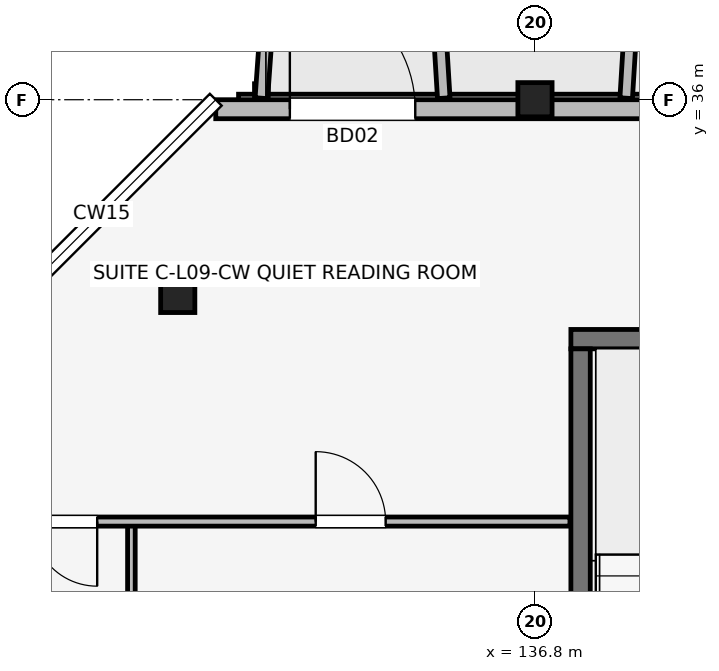
"""IFC4 building model, lengths in metres.
Left out: names, types, materials, properties, quantities, classifications, styles, units other than length and angle.
Written with IfcOpenShell. Run it as: python <this file> out.ifc"""

import sys

from ifc_helpers import new_model, si_unit, direction, frame, frame_2d, origin, origin_2d, place, context, subcontext, project, spatial, rectangle, extrude, element, fill, save


model = new_model("IFC4")
c1 = context("Model", 3, precision=1e-05, world=origin(), true_north=direction((0.0, 1.0)))
c2 = subcontext(c1, "Body", "Model", "MODEL_VIEW")
j1 = project(units=[si_unit("LENGTHUNIT", "METRE"), si_unit("PLANEANGLEUNIT", "RADIAN")], contexts=[c1])
p1 = place(None, origin())
s1 = spatial("IfcSite", under=j1, at=p1, CompositionType="ELEMENT")
p2 = place(p1, origin())
s2 = spatial("IfcBuilding", under=s1, at=p2, CompositionType="ELEMENT")
p3 = place(p2, frame((0.0, 0.0, 30.75)))
s3 = spatial("IfcBuildingStorey", under=s2, at=p3, CompositionType="ELEMENT", Elevation=30.75)
p4 = place(p3, frame((132.1, 33.5, 0.0), z_axis=(0.0, 0.0, 1.0), x_axis=(1.0, 0.0, 0.0)))
e1 = element("IfcColumn", 1, at=p4, inside=s3, PredefinedType="COLUMN", context=c2, shape_type="SweptSolid", body=[
    extrude(rectangle(XDim=0.45, YDim=0.6, at=origin_2d()), origin(), (0.0, 0.0, 1.0), 3.15),
])
p5 = place(p3, frame((136.8, 36.0, 0.0), z_axis=(0.0, 0.0, 1.0), x_axis=(1.0, 0.0, 0.0)))
e2 = element("IfcColumn", 2, at=p5, inside=s3, PredefinedType="COLUMN", context=c2, shape_type="SweptSolid", body=[
    extrude(rectangle(XDim=0.45, YDim=0.45, at=origin_2d()), origin(), (0.0, 0.0, 1.0), 3.15),
])
p6 = place(p3, frame((137.272, 32.85, 0.0), z_axis=(0.0, 0.0, 1.0), x_axis=(1.0, 0.0, 0.0)))
e3 = element("IfcWall", 3, at=p6, inside=s3, PredefinedType="SHEAR", context=c2, shape_type="SweptSolid", body=[
    extrude(rectangle(XDim=3.305, YDim=0.255, at=frame_2d((1.652, 0.0))), origin(), (0.0, 0.0, 1.0), 3.15),
])
p7 = place(p3, frame((137.4, 26.427, 0.0), z_axis=(0.0, 0.0, 1.0), x_axis=(0.0, 1.0, 0.0)))
e4 = element("IfcWall", 4, at=p7, inside=s3, PredefinedType="SHEAR", context=c2, shape_type="SweptSolid", body=[
    extrude(rectangle(XDim=6.295, YDim=0.255, at=frame_2d((3.147, 0.0))), origin(), (0.0, 0.0, 1.0), 3.15),
])
p8 = place(p3, frame((162.6, 35.875, 0.0), z_axis=(0.0, 0.0, 1.0), x_axis=(-1.0, 0.0, 0.0)))
e5 = element("IfcWall", 5, at=p8, inside=s3, PredefinedType="SOLIDWALL", context=c2, shape_type="SweptSolid", body=[
    extrude(rectangle(XDim=30.0, YDim=0.25, at=frame_2d((15.0, 0.0))), origin(), (0.0, 0.0, 1.0), 2.48),
])
p9 = place(p8, frame((29.025, 0.0, 0.0), z_axis=(0.0, 0.0, 1.0), x_axis=(-1.0, 0.0, 0.0)))
e6 = element("IfcOpeningElement", 6, at=p9, cuts=e5, PredefinedType="OPENING", context=c2, shape_type="SweptSolid", body=[
    extrude(rectangle(XDim=1.65, YDim=2.15, at=frame_2d((0.825, 1.075))), frame((0.0, 0.135, 0.0), z_axis=(0.0, -1.0, 0.0), x_axis=(1.0, 0.0, 0.0)), (0.0, 0.0, 1.0), 0.27),
])
p10 = place(p8, frame((2.7, 0.0, 0.0), z_axis=(0.0, 0.0, 1.0), x_axis=(-1.0, 0.0, 0.0)))
e7 = element("IfcOpeningElement", 7, at=p10, cuts=e5, PredefinedType="OPENING", context=c2, shape_type="SweptSolid", body=[
    extrude(rectangle(XDim=1.8, YDim=2.15, at=frame_2d((0.9, 1.075))), frame((0.0, 0.135, 0.0), z_axis=(0.0, -1.0, 0.0), x_axis=(1.0, 0.0, 0.0)), (0.0, 0.0, 1.0), 0.27),
])
p11 = place(p8, frame((15.43, 0.0, 0.5)))
e8 = element("IfcOpeningElement", 8, at=p11, cuts=e5, PredefinedType="OPENING", context=c2, shape_type="SweptSolid", body=[
    extrude(rectangle(XDim=0.75, YDim=1.75, at=frame_2d((0.375, 0.875))), frame((0.0, 0.135, 0.0), z_axis=(0.0, -1.0, 0.0), x_axis=(1.0, 0.0, 0.0)), (0.0, 0.0, 1.0), 0.27),
])
p12 = place(p8, frame((8.075, 0.0, 0.7)))
e9 = element("IfcOpeningElement", 9, at=p12, cuts=e5, PredefinedType="OPENING", context=c2, shape_type="SweptSolid", body=[
    extrude(rectangle(XDim=2.0, YDim=1.65, at=frame_2d((1.0, 0.825))), frame((0.0, 0.135, 0.0), z_axis=(0.0, -1.0, 0.0), x_axis=(1.0, 0.0, 0.0)), (0.0, 0.0, 1.0), 0.27),
])
p13 = place(p8, frame((19.97, 0.0, 0.7)))
e10 = element("IfcOpeningElement", 10, at=p13, cuts=e5, PredefinedType="OPENING", context=c2, shape_type="SweptSolid", body=[
    extrude(rectangle(XDim=1.86, YDim=1.6, at=frame_2d((0.93, 0.8))), frame((0.0, 0.135, 0.0), z_axis=(0.0, -1.0, 0.0), x_axis=(1.0, 0.0, 0.0)), (0.0, 0.0, 1.0), 0.27),
])
p14 = place(p3, frame((133.2, 36.02, 0.0), z_axis=(0.0, 0.0, 1.0), x_axis=(0.071317687608, 0.997453651772, 0.0)))
e11 = element("IfcWall", 11, at=p14, inside=s3, PredefinedType="ELEMENTEDWALL", context=c2, shape_type="SweptSolid", body=[
    extrude(rectangle(XDim=1.965, YDim=0.165, at=frame_2d((0.982, 0.0))), origin(), (0.0, 0.0, 1.0), 2.95),
])
p15 = place(p3, frame((135.6, 36.02, 0.0), z_axis=(0.0, 0.0, 1.0), x_axis=(-0.061170732449, 0.998127317276, 0.0)))
e12 = element("IfcWall", 12, at=p15, inside=s3, PredefinedType="ELEMENTEDWALL", context=c2, shape_type="SweptSolid", body=[
    extrude(rectangle(XDim=1.964, YDim=0.165, at=frame_2d((0.982, 0.0))), origin(), (0.0, 0.0, 1.0), 2.95),
])
p16 = place(p3, frame((138.0, 36.02, 0.0), z_axis=(0.0, 0.0, 1.0), x_axis=(0.061170732449, 0.998127317276, 0.0)))
e13 = element("IfcWall", 13, at=p16, inside=s3, PredefinedType="ELEMENTEDWALL", context=c2, shape_type="SweptSolid", body=[
    extrude(rectangle(XDim=1.964, YDim=0.165, at=frame_2d((0.982, 0.0))), origin(), (0.0, 0.0, 1.0), 2.48),
])
p17 = place(p3, frame((131.49, 26.1, 0.0), z_axis=(0.0, 0.0, 1.0), x_axis=(0.0, 1.0, 0.0)))
e14 = element("IfcWall", 14, at=p17, inside=s3, PredefinedType="PARTITIONING", context=c2, shape_type="SweptSolid", body=[
    extrude(rectangle(XDim=4.35, YDim=0.1, at=frame_2d((2.175, 0.0))), origin(), (0.0, 0.0, 1.0), 2.38),
])
p18 = place(p3, frame((129.74, 30.45, 0.0), z_axis=(0.0, 0.0, 1.0), x_axis=(1.0, 0.0, 0.0)))
e15 = element("IfcWall", 15, at=p18, inside=s3, PredefinedType="PARTITIONING", context=c2, shape_type="SweptSolid", body=[
    extrude(rectangle(XDim=7.52, YDim=0.12, at=frame_2d((3.76, 0.0))), origin(), (0.0, 0.0, 1.0), 2.38),
])
p19 = place(p18, frame((1.3, 0.0, 0.0), z_axis=(0.0, 0.0, 1.0), x_axis=(-1.0, 0.0, 0.0)))
e16 = element("IfcOpeningElement", 16, at=p19, cuts=e15, PredefinedType="OPENING", context=c2, shape_type="SweptSolid", body=[
    extrude(rectangle(XDim=0.85, YDim=2.08, at=frame_2d((0.425, 1.04))), frame((0.0, 0.07, 0.0), z_axis=(0.0, -1.0, 0.0), x_axis=(1.0, 0.0, 0.0)), (0.0, 0.0, 1.0), 0.14),
])
p20 = place(p18, frame((4.175, 0.0, 0.0)))
e17 = element("IfcOpeningElement", 17, at=p20, cuts=e15, PredefinedType="OPENING", context=c2, shape_type="SweptSolid", body=[
    extrude(rectangle(XDim=0.92, YDim=2.08, at=frame_2d((0.46, 1.04))), frame((0.0, 0.07, 0.0), z_axis=(0.0, -1.0, 0.0), x_axis=(1.0, 0.0, 0.0)), (0.0, 0.0, 1.0), 0.14),
])
p21 = place(p9, origin())
e18 = element("IfcDoor", 18, at=p21, inside=s3, OperationType="SINGLE_SWING_RIGHT", PredefinedType="DOOR", context=c2, shape_type="SweptSolid", body=[
    extrude(rectangle(XDim=1.65, YDim=2.15, at=frame_2d((0.825, 1.075))), frame((0.0, 0.025, 0.0), z_axis=(0.0, -1.0, 0.0), x_axis=(1.0, 0.0, 0.0)), (0.0, 0.0, 1.0), 0.05),
])
fill(e6, e18)
p22 = place(p19, origin())
e19 = element("IfcDoor", 19, at=p22, inside=s3, OperationType="SINGLE_SWING_RIGHT", PredefinedType="DOOR", context=c2, shape_type="SweptSolid", body=[
    extrude(rectangle(XDim=0.85, YDim=2.08, at=frame_2d((0.425, 1.04))), frame((0.0, 0.025, 0.0), z_axis=(0.0, -1.0, 0.0), x_axis=(1.0, 0.0, 0.0)), (0.0, 0.0, 1.0), 0.05),
])
fill(e16, e19)
p23 = place(p20, origin())
e20 = element("IfcDoor", 20, at=p23, inside=s3, OperationType="SINGLE_SWING_LEFT", PredefinedType="DOOR", context=c2, shape_type="SweptSolid", body=[
    extrude(rectangle(XDim=0.92, YDim=2.08, at=frame_2d((0.46, 1.04))), frame((0.0, 0.025, 0.0), z_axis=(0.0, -1.0, 0.0), x_axis=(1.0, 0.0, 0.0)), (0.0, 0.0, 1.0), 0.05),
])
fill(e17, e20)
save(model, sys.argv[1])
